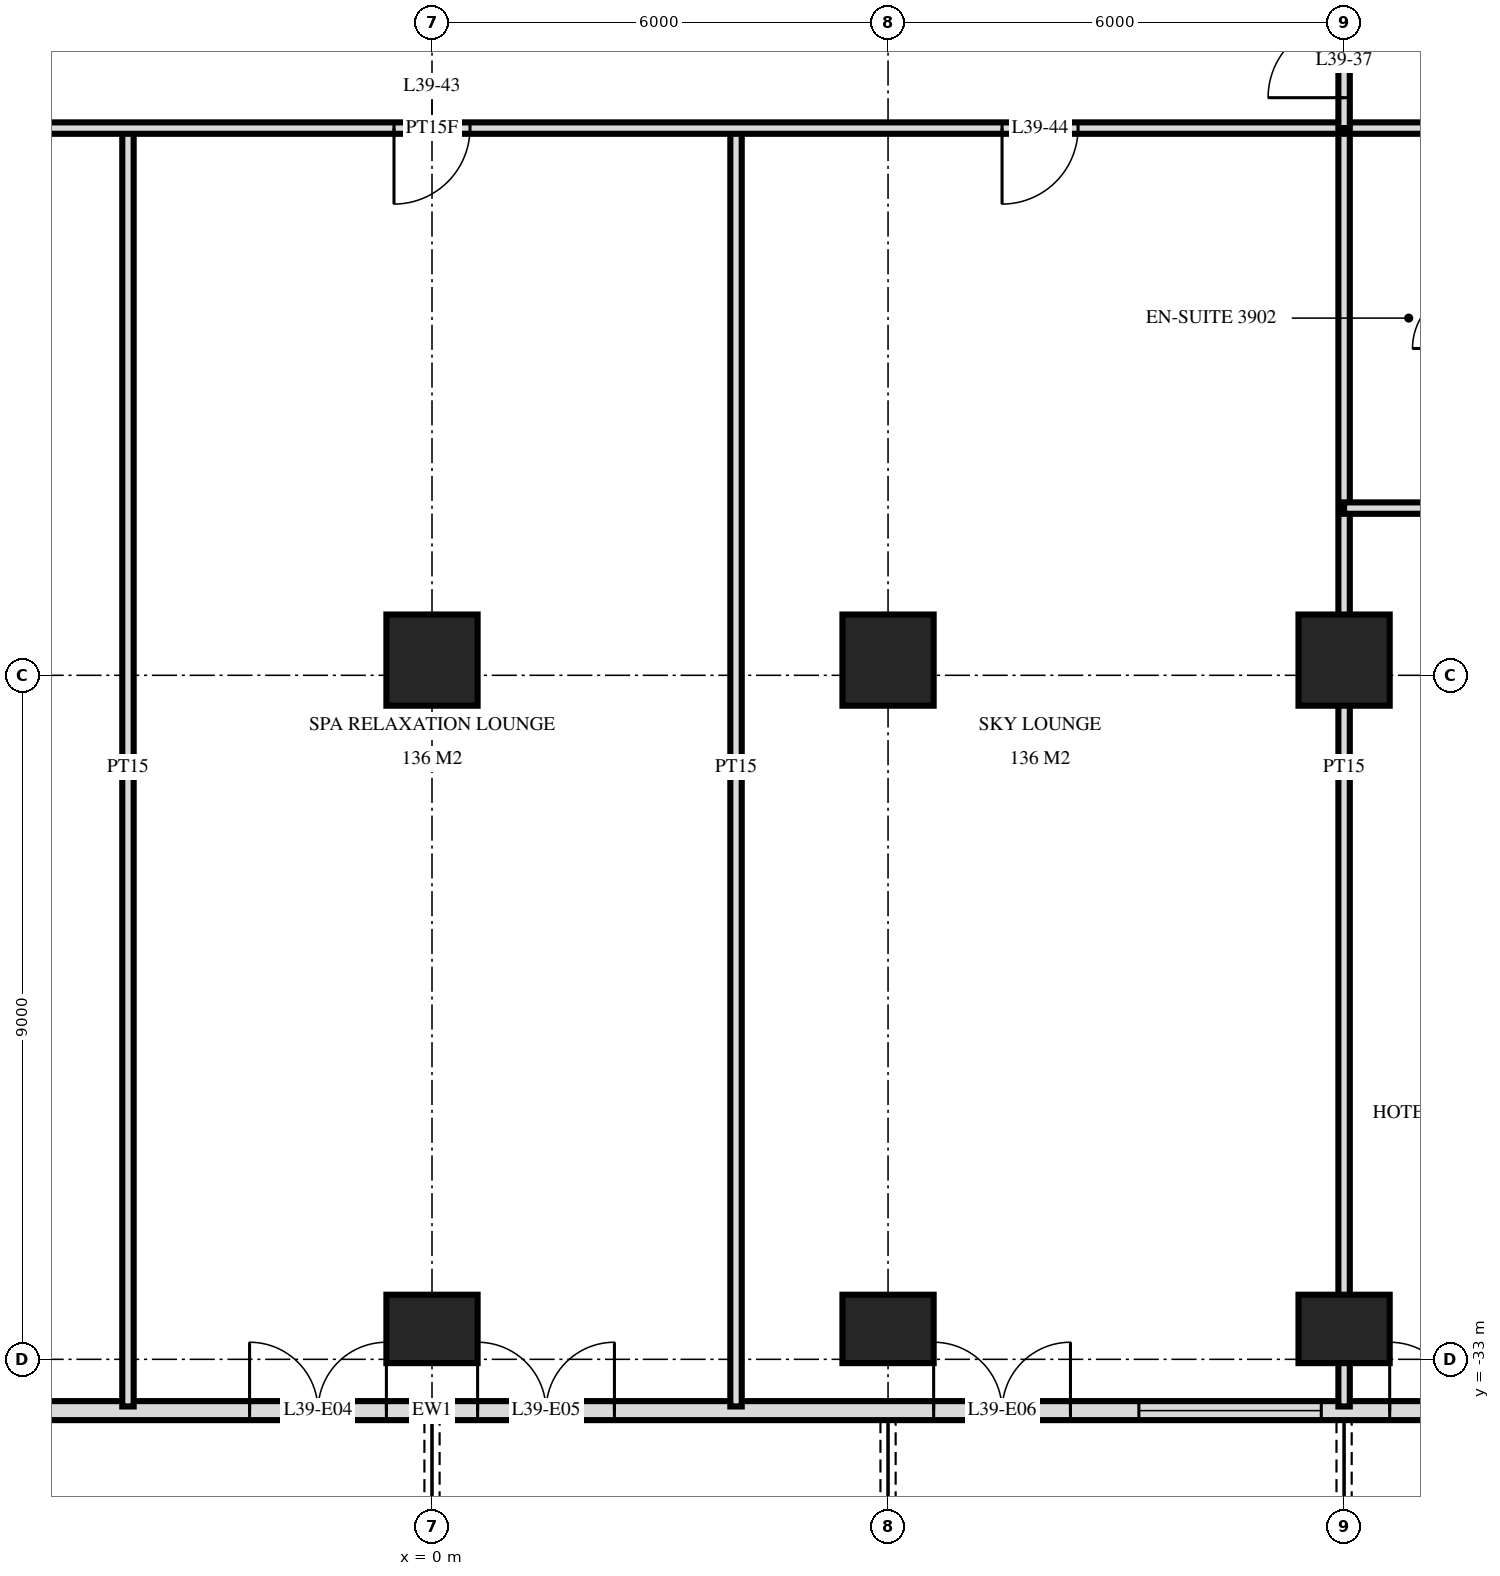
"""IFC4 building model, lengths in metres.
Left out: names, types, materials, properties, quantities, classifications, styles, units other than length and angle.
Written with IfcOpenShell. Run it as: python <this file> out.ifc"""

import sys

from ifc_helpers import new_model, si_unit, direction, frame, frame_2d, origin, origin_2d, place, context, subcontext, project, spatial, rectangle, extrude, element, fill, save


model = new_model("IFC4")
c1 = context("Model", 3, precision=1e-05, world=origin(), true_north=direction((0.0, 1.0)))
c2 = subcontext(c1, "Body", "Model", "MODEL_VIEW")
j1 = project(units=[si_unit("LENGTHUNIT", "METRE"), si_unit("PLANEANGLEUNIT", "RADIAN")], contexts=[c1])
p1 = place(None, origin())
s1 = spatial("IfcSite", under=j1, at=p1, CompositionType="ELEMENT")
p2 = place(p1, origin())
s2 = spatial("IfcBuilding", under=s1, at=p2, CompositionType="ELEMENT")
p3 = place(p2, frame((0.0, 0.0, 152.4)))
s3 = spatial("IfcBuildingStorey", under=s2, at=p3, CompositionType="ELEMENT", Elevation=152.4)
p4 = place(p3, frame((0.0, -32.6, 0.0), z_axis=(0.0, 0.0, 1.0), x_axis=(1.0, 0.0, 0.0)))
e1 = element("IfcColumn", 1, at=p4, inside=s3, PredefinedType="COLUMN", context=c2, shape_type="SweptSolid", body=[
    extrude(rectangle(XDim=1.2, YDim=0.9, at=origin_2d()), origin(), (0.0, 0.0, 1.0), 3.6),
])
p5 = place(p3, frame((0.0, -23.8, 0.0), z_axis=(0.0, 0.0, 1.0), x_axis=(1.0, 0.0, 0.0)))
e2 = element("IfcColumn", 2, at=p5, inside=s3, PredefinedType="COLUMN", context=c2, shape_type="SweptSolid", body=[
    extrude(rectangle(XDim=1.2, YDim=1.2, at=origin_2d()), origin(), (0.0, 0.0, 1.0), 3.6),
])
p6 = place(p3, frame((6.0, -32.6, 0.0), z_axis=(0.0, 0.0, 1.0), x_axis=(1.0, 0.0, 0.0)))
e3 = element("IfcColumn", 3, at=p6, inside=s3, PredefinedType="COLUMN", context=c2, shape_type="SweptSolid", body=[
    extrude(rectangle(XDim=1.2, YDim=0.9, at=origin_2d()), origin(), (0.0, 0.0, 1.0), 3.6),
])
p7 = place(p3, frame((6.0, -23.8, 0.0), z_axis=(0.0, 0.0, 1.0), x_axis=(1.0, 0.0, 0.0)))
e4 = element("IfcColumn", 4, at=p7, inside=s3, PredefinedType="COLUMN", context=c2, shape_type="SweptSolid", body=[
    extrude(rectangle(XDim=1.2, YDim=1.2, at=origin_2d()), origin(), (0.0, 0.0, 1.0), 3.6),
])
p8 = place(p3, frame((12.0, -32.6, 0.0), z_axis=(0.0, 0.0, 1.0), x_axis=(1.0, 0.0, 0.0)))
e5 = element("IfcColumn", 5, at=p8, inside=s3, PredefinedType="COLUMN", context=c2, shape_type="SweptSolid", body=[
    extrude(rectangle(XDim=1.2, YDim=0.9, at=origin_2d()), origin(), (0.0, 0.0, 1.0), 3.6),
])
p9 = place(p3, frame((12.0, -23.8, 0.0), z_axis=(0.0, 0.0, 1.0), x_axis=(1.0, 0.0, 0.0)))
e6 = element("IfcColumn", 6, at=p9, inside=s3, PredefinedType="COLUMN", context=c2, shape_type="SweptSolid", body=[
    extrude(rectangle(XDim=1.2, YDim=1.2, at=origin_2d()), origin(), (0.0, 0.0, 1.0), 3.6),
])
p10 = place(p3, frame((-23.675, -33.675, 0.0), z_axis=(0.0, 0.0, 1.0), x_axis=(1.0, 0.0, 0.0)))
e7 = element("IfcWall", 7, at=p10, inside=s3, PredefinedType="SOLIDWALL", context=c2, shape_type="SweptSolid", body=[
    extrude(rectangle(XDim=47.351, YDim=0.25, at=frame_2d((23.675, 0.0))), origin(), (0.0, 0.0, 1.0), 3.32),
])
p11 = place(p10, frame((3.425, 0.0, 0.0)))
e8 = element("IfcOpeningElement", 8, at=p11, cuts=e7, PredefinedType="OPENING", context=c2, shape_type="SweptSolid", body=[
    extrude(rectangle(XDim=1.8, YDim=2.4, at=frame_2d((0.9, 1.2))), frame((0.0, 0.135, 0.0), z_axis=(0.0, -1.0, 0.0), x_axis=(1.0, 0.0, 0.0)), (0.0, 0.0, 1.0), 0.27),
])
p12 = place(p10, frame((6.275, 0.0, 0.0)))
e9 = element("IfcOpeningElement", 9, at=p12, cuts=e7, PredefinedType="OPENING", context=c2, shape_type="SweptSolid", body=[
    extrude(rectangle(XDim=1.8, YDim=2.4, at=frame_2d((0.9, 1.2))), frame((0.0, 0.135, 0.0), z_axis=(0.0, -1.0, 0.0), x_axis=(1.0, 0.0, 0.0)), (0.0, 0.0, 1.0), 0.27),
])
p13 = place(p10, frame((8.975, 0.0, 0.3)))
e10 = element("IfcOpeningElement", 10, at=p13, cuts=e7, PredefinedType="OPENING", context=c2, shape_type="SweptSolid", body=[
    extrude(rectangle(XDim=2.4, YDim=2.1, at=frame_2d((1.2, 1.05))), frame((0.0, 0.135, 0.0), z_axis=(0.0, -1.0, 0.0), x_axis=(1.0, 0.0, 0.0)), (0.0, 0.0, 1.0), 0.27),
])
p14 = place(p10, frame((12.275, 0.0, 0.0)))
e11 = element("IfcOpeningElement", 11, at=p14, cuts=e7, PredefinedType="OPENING", context=c2, shape_type="SweptSolid", body=[
    extrude(rectangle(XDim=1.8, YDim=2.4, at=frame_2d((0.9, 1.2))), frame((0.0, 0.135, 0.0), z_axis=(0.0, -1.0, 0.0), x_axis=(1.0, 0.0, 0.0)), (0.0, 0.0, 1.0), 0.27),
])
p15 = place(p10, frame((14.975, 0.0, 0.3)))
e12 = element("IfcOpeningElement", 12, at=p15, cuts=e7, PredefinedType="OPENING", context=c2, shape_type="SweptSolid", body=[
    extrude(rectangle(XDim=2.4, YDim=2.1, at=frame_2d((1.2, 1.05))), frame((0.0, 0.135, 0.0), z_axis=(0.0, -1.0, 0.0), x_axis=(1.0, 0.0, 0.0)), (0.0, 0.0, 1.0), 0.27),
])
p16 = place(p10, frame((21.275, 0.0, 0.0)))
e13 = element("IfcOpeningElement", 13, at=p16, cuts=e7, PredefinedType="OPENING", context=c2, shape_type="SweptSolid", body=[
    extrude(rectangle(XDim=1.8, YDim=2.4, at=frame_2d((0.9, 1.2))), frame((0.0, 0.135, 0.0), z_axis=(0.0, -1.0, 0.0), x_axis=(1.0, 0.0, 0.0)), (0.0, 0.0, 1.0), 0.27),
])
p17 = place(p10, frame((24.275, 0.0, 0.0)))
e14 = element("IfcOpeningElement", 14, at=p17, cuts=e7, PredefinedType="OPENING", context=c2, shape_type="SweptSolid", body=[
    extrude(rectangle(XDim=1.8, YDim=2.4, at=frame_2d((0.9, 1.2))), frame((0.0, 0.135, 0.0), z_axis=(0.0, -1.0, 0.0), x_axis=(1.0, 0.0, 0.0)), (0.0, 0.0, 1.0), 0.27),
])
p18 = place(p10, frame((30.275, 0.0, 0.0)))
e15 = element("IfcOpeningElement", 15, at=p18, cuts=e7, PredefinedType="OPENING", context=c2, shape_type="SweptSolid", body=[
    extrude(rectangle(XDim=1.8, YDim=2.4, at=frame_2d((0.9, 1.2))), frame((0.0, 0.135, 0.0), z_axis=(0.0, -1.0, 0.0), x_axis=(1.0, 0.0, 0.0)), (0.0, 0.0, 1.0), 0.27),
])
p19 = place(p10, frame((32.975, 0.0, 0.3)))
e16 = element("IfcOpeningElement", 16, at=p19, cuts=e7, PredefinedType="OPENING", context=c2, shape_type="SweptSolid", body=[
    extrude(rectangle(XDim=2.4, YDim=2.1, at=frame_2d((1.2, 1.05))), frame((0.0, 0.135, 0.0), z_axis=(0.0, -1.0, 0.0), x_axis=(1.0, 0.0, 0.0)), (0.0, 0.0, 1.0), 0.27),
])
p20 = place(p10, frame((36.275, 0.0, 0.0)))
e17 = element("IfcOpeningElement", 17, at=p20, cuts=e7, PredefinedType="OPENING", context=c2, shape_type="SweptSolid", body=[
    extrude(rectangle(XDim=1.8, YDim=2.4, at=frame_2d((0.9, 1.2))), frame((0.0, 0.135, 0.0), z_axis=(0.0, -1.0, 0.0), x_axis=(1.0, 0.0, 0.0)), (0.0, 0.0, 1.0), 0.27),
])
p21 = place(p10, frame((38.975, 0.0, 0.3)))
e18 = element("IfcOpeningElement", 18, at=p21, cuts=e7, PredefinedType="OPENING", context=c2, shape_type="SweptSolid", body=[
    extrude(rectangle(XDim=2.4, YDim=2.1, at=frame_2d((1.2, 1.05))), frame((0.0, 0.135, 0.0), z_axis=(0.0, -1.0, 0.0), x_axis=(1.0, 0.0, 0.0)), (0.0, 0.0, 1.0), 0.27),
])
p22 = place(p10, frame((42.275, 0.0, 0.0)))
e19 = element("IfcOpeningElement", 19, at=p22, cuts=e7, PredefinedType="OPENING", context=c2, shape_type="SweptSolid", body=[
    extrude(rectangle(XDim=1.8, YDim=2.4, at=frame_2d((0.9, 1.2))), frame((0.0, 0.135, 0.0), z_axis=(0.0, -1.0, 0.0), x_axis=(1.0, 0.0, 0.0)), (0.0, 0.0, 1.0), 0.27),
])
p23 = place(p10, frame((45.125, 0.0, 0.3)))
e20 = element("IfcOpeningElement", 20, at=p23, cuts=e7, PredefinedType="OPENING", context=c2, shape_type="SweptSolid", body=[
    extrude(rectangle(XDim=1.8, YDim=2.1, at=frame_2d((0.9, 1.05))), frame((0.0, 0.135, 0.0), z_axis=(0.0, -1.0, 0.0), x_axis=(1.0, 0.0, 0.0)), (0.0, 0.0, 1.0), 0.27),
])
p24 = place(p3, frame((12.0, -16.8, 0.0), z_axis=(0.0, 0.0, 1.0), x_axis=(0.0, 1.0, 0.0)))
e21 = element("IfcWall", 21, at=p24, inside=s3, PredefinedType="PARTITIONING", context=c2, shape_type="SweptSolid", body=[
    extrude(rectangle(XDim=1.75, YDim=0.15, at=frame_2d((0.875, 0.0))), origin(), (0.0, 0.0, 1.0), 3.32),
])
p25 = place(p24, frame((0.4, 0.0, 0.0)))
e22 = element("IfcOpeningElement", 22, at=p25, cuts=e21, PredefinedType="OPENING", context=c2, shape_type="SweptSolid", body=[
    extrude(rectangle(XDim=1.0, YDim=2.1, at=frame_2d((0.5, 1.05))), frame((0.0, 0.085, 0.0), z_axis=(0.0, -1.0, 0.0), x_axis=(1.0, 0.0, 0.0)), (0.0, 0.0, 1.0), 0.17),
])
for number, where, z_axis, x_axis in (
    (23, (12.0, -33.62, 0.0), (0.0, 0.0, 1.0), (0.0, 1.0, 0.0)),
    (24, (4.0, -33.62, 0.0), (0.0, 0.0, 1.0), (0.0, 1.0, 0.0)),
    (25, (-4.0, -33.62, 0.0), (0.0, 0.0, 1.0), (0.0, 1.0, 0.0)),
):
    element("IfcWall", number, at=place(p3, frame(where, z_axis=z_axis, x_axis=x_axis)), inside=s3, PredefinedType="PARTITIONING", context=c2, shape_type="SweptSolid", body=[
        extrude(rectangle(XDim=16.82, YDim=0.15, at=frame_2d((8.41, 0.0))), origin(), (0.0, 0.0, 1.0), 3.32),
    ])
p26 = place(p3, frame((12.0, -21.8, 0.0), z_axis=(0.0, 0.0, 1.0), x_axis=(1.0, 0.0, 0.0)))
e26 = element("IfcWall", 26, at=p26, inside=s3, PredefinedType="PARTITIONING", context=c2, shape_type="SweptSolid", body=[
    extrude(rectangle(XDim=1.7, YDim=0.15, at=frame_2d((0.85, 0.0))), origin(), (0.0, 0.0, 1.0), 3.32),
])
p27 = place(p3, frame((-28.02, -16.8, 0.0), z_axis=(0.0, 0.0, 1.0), x_axis=(1.0, 0.0, 0.0)))
e27 = element("IfcWall", 27, at=p27, inside=s3, PredefinedType="PARTITIONING", context=c2, shape_type="SweptSolid", body=[
    extrude(rectangle(XDim=56.04, YDim=0.15, at=frame_2d((28.02, 0.0))), origin(), (0.0, 0.0, 1.0), 3.32),
])
p28 = place(p27, frame((13.17, 0.0, 0.0)))
e28 = element("IfcOpeningElement", 28, at=p28, cuts=e27, PredefinedType="OPENING", context=c2, shape_type="SweptSolid", body=[
    extrude(rectangle(XDim=1.0, YDim=2.1, at=frame_2d((0.5, 1.05))), frame((0.0, 0.085, 0.0), z_axis=(0.0, -1.0, 0.0), x_axis=(1.0, 0.0, 0.0)), (0.0, 0.0, 1.0), 0.17),
])
p29 = place(p27, frame((11.32, 0.0, 0.0)))
e29 = element("IfcOpeningElement", 29, at=p29, cuts=e27, PredefinedType="OPENING", context=c2, shape_type="SweptSolid", body=[
    extrude(rectangle(XDim=1.0, YDim=2.1, at=frame_2d((0.5, 1.05))), frame((0.0, 0.085, 0.0), z_axis=(0.0, -1.0, 0.0), x_axis=(1.0, 0.0, 0.0)), (0.0, 0.0, 1.0), 0.17),
])
p30 = place(p27, frame((41.87, 0.0, 0.0)))
e30 = element("IfcOpeningElement", 30, at=p30, cuts=e27, PredefinedType="OPENING", context=c2, shape_type="SweptSolid", body=[
    extrude(rectangle(XDim=1.0, YDim=2.1, at=frame_2d((0.5, 1.05))), frame((0.0, 0.085, 0.0), z_axis=(0.0, -1.0, 0.0), x_axis=(1.0, 0.0, 0.0)), (0.0, 0.0, 1.0), 0.17),
])
p31 = place(p27, frame((43.72, 0.0, 0.0)))
e31 = element("IfcOpeningElement", 31, at=p31, cuts=e27, PredefinedType="OPENING", context=c2, shape_type="SweptSolid", body=[
    extrude(rectangle(XDim=1.0, YDim=2.1, at=frame_2d((0.5, 1.05))), frame((0.0, 0.085, 0.0), z_axis=(0.0, -1.0, 0.0), x_axis=(1.0, 0.0, 0.0)), (0.0, 0.0, 1.0), 0.17),
])
p32 = place(p27, frame((19.52, 0.0, 0.0)))
e32 = element("IfcOpeningElement", 32, at=p32, cuts=e27, PredefinedType="OPENING", context=c2, shape_type="SweptSolid", body=[
    extrude(rectangle(XDim=1.0, YDim=2.1, at=frame_2d((0.5, 1.05))), frame((0.0, 0.085, 0.0), z_axis=(0.0, -1.0, 0.0), x_axis=(1.0, 0.0, 0.0)), (0.0, 0.0, 1.0), 0.17),
])
p33 = place(p27, frame((27.52, 0.0, 0.0)))
e33 = element("IfcOpeningElement", 33, at=p33, cuts=e27, PredefinedType="OPENING", context=c2, shape_type="SweptSolid", body=[
    extrude(rectangle(XDim=1.0, YDim=2.1, at=frame_2d((0.5, 1.05))), frame((0.0, 0.085, 0.0), z_axis=(0.0, -1.0, 0.0), x_axis=(1.0, 0.0, 0.0)), (0.0, 0.0, 1.0), 0.17),
])
p34 = place(p27, frame((35.52, 0.0, 0.0)))
e34 = element("IfcOpeningElement", 34, at=p34, cuts=e27, PredefinedType="OPENING", context=c2, shape_type="SweptSolid", body=[
    extrude(rectangle(XDim=1.0, YDim=2.1, at=frame_2d((0.5, 1.05))), frame((0.0, 0.085, 0.0), z_axis=(0.0, -1.0, 0.0), x_axis=(1.0, 0.0, 0.0)), (0.0, 0.0, 1.0), 0.17),
])
p35 = place(p16, origin())
e35 = element("IfcDoor", 35, at=p35, inside=s3, OperationType="DOUBLE_DOOR_SINGLE_SWING", PredefinedType="DOOR", context=c2, shape_type="SweptSolid", body=[
    extrude(rectangle(XDim=1.8, YDim=2.4, at=frame_2d((0.9, 1.2))), frame((0.0, 0.025, 0.0), z_axis=(0.0, -1.0, 0.0), x_axis=(1.0, 0.0, 0.0)), (0.0, 0.0, 1.0), 0.05),
])
fill(e13, e35)
p36 = place(p17, origin())
e36 = element("IfcDoor", 36, at=p36, inside=s3, OperationType="DOUBLE_DOOR_SINGLE_SWING", PredefinedType="DOOR", context=c2, shape_type="SweptSolid", body=[
    extrude(rectangle(XDim=1.8, YDim=2.4, at=frame_2d((0.9, 1.2))), frame((0.0, 0.025, 0.0), z_axis=(0.0, -1.0, 0.0), x_axis=(1.0, 0.0, 0.0)), (0.0, 0.0, 1.0), 0.05),
])
fill(e14, e36)
p37 = place(p18, origin())
e37 = element("IfcDoor", 37, at=p37, inside=s3, OperationType="DOUBLE_DOOR_SINGLE_SWING", PredefinedType="DOOR", context=c2, shape_type="SweptSolid", body=[
    extrude(rectangle(XDim=1.8, YDim=2.4, at=frame_2d((0.9, 1.2))), frame((0.0, 0.025, 0.0), z_axis=(0.0, -1.0, 0.0), x_axis=(1.0, 0.0, 0.0)), (0.0, 0.0, 1.0), 0.05),
])
fill(e15, e37)
p38 = place(p19, origin())
e38 = element("IfcWindow", 38, at=p38, inside=s3, PartitioningType="SINGLE_PANEL", PredefinedType="WINDOW", context=c2, shape_type="SweptSolid", body=[
    extrude(rectangle(XDim=2.4, YDim=2.1, at=frame_2d((1.2, 1.05))), frame((0.0, 0.03, 0.0), z_axis=(0.0, -1.0, 0.0), x_axis=(1.0, 0.0, 0.0)), (0.0, 0.0, 1.0), 0.06),
])
fill(e16, e38)
p39 = place(p20, origin())
e39 = element("IfcDoor", 39, at=p39, inside=s3, OperationType="DOUBLE_DOOR_SINGLE_SWING", PredefinedType="DOOR", context=c2, shape_type="SweptSolid", body=[
    extrude(rectangle(XDim=1.8, YDim=2.4, at=frame_2d((0.9, 1.2))), frame((0.0, 0.025, 0.0), z_axis=(0.0, -1.0, 0.0), x_axis=(1.0, 0.0, 0.0)), (0.0, 0.0, 1.0), 0.05),
])
fill(e17, e39)
p40 = place(p25, origin())
e40 = element("IfcDoor", 40, at=p40, inside=s3, OperationType="SINGLE_SWING_RIGHT", PredefinedType="DOOR", context=c2, shape_type="SweptSolid", body=[
    extrude(rectangle(XDim=1.0, YDim=2.1, at=frame_2d((0.5, 1.05))), frame((0.0, 0.025, 0.0), z_axis=(0.0, -1.0, 0.0), x_axis=(1.0, 0.0, 0.0)), (0.0, 0.0, 1.0), 0.05),
])
fill(e22, e40)
p41 = place(p33, frame((0.5, 0.0, 0.0), z_axis=(0.0, 0.0, 1.0), x_axis=(-1.0, 0.0, 0.0)))
e41 = element("IfcDoor", 41, at=p41, inside=s3, OperationType="SINGLE_SWING_LEFT", PredefinedType="DOOR", context=c2, shape_type="SweptSolid", body=[
    extrude(rectangle(XDim=1.0, YDim=2.1, at=frame_2d((0.0, 1.05))), frame((0.0, -0.025, 0.0), z_axis=(0.0, 1.0, 0.0), x_axis=(-1.0, 0.0, 0.0)), (0.0, 0.0, 1.0), 0.05),
])
fill(e33, e41)
p42 = place(p34, frame((0.5, 0.0, 0.0), z_axis=(0.0, 0.0, 1.0), x_axis=(-1.0, 0.0, 0.0)))
e42 = element("IfcDoor", 42, at=p42, inside=s3, OperationType="SINGLE_SWING_LEFT", PredefinedType="DOOR", context=c2, shape_type="SweptSolid", body=[
    extrude(rectangle(XDim=1.0, YDim=2.1, at=frame_2d((0.0, 1.05))), frame((0.0, -0.025, 0.0), z_axis=(0.0, 1.0, 0.0), x_axis=(-1.0, 0.0, 0.0)), (0.0, 0.0, 1.0), 0.05),
])
fill(e34, e42)
save(model, sys.argv[1])
